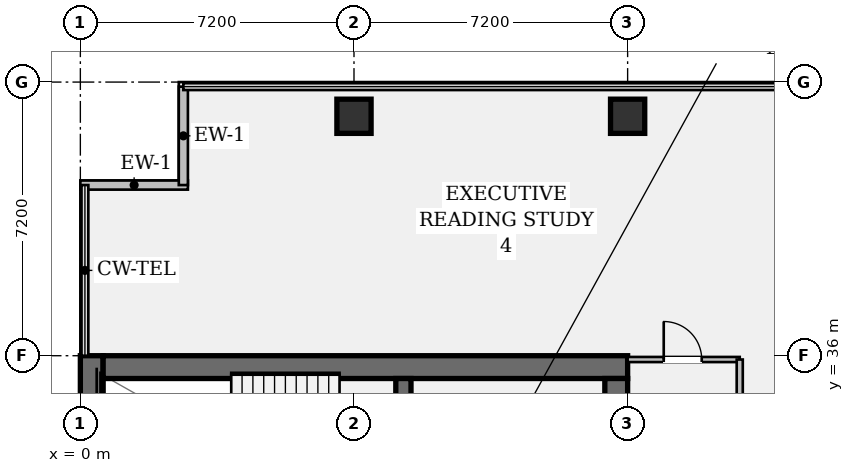
"""IFC4 building model, lengths in metres.
Left out: names, types, materials, properties, quantities, classifications, styles, units other than length and angle.
Written with IfcOpenShell. Run it as: python <this file> out.ifc"""

import sys

from ifc_helpers import new_model, si_unit, direction, frame, frame_2d, origin, origin_2d, place, context, subcontext, project, spatial, rectangle, hollow_rectangle, extrude, element, fill, save


model = new_model("IFC4")
c1 = context("Model", 3, precision=1e-05, world=origin(), true_north=direction((0.0, 1.0)))
c2 = subcontext(c1, "Body", "Model", "MODEL_VIEW")
j1 = project(units=[si_unit("LENGTHUNIT", "METRE"), si_unit("PLANEANGLEUNIT", "RADIAN")], contexts=[c1])
p1 = place(None, origin())
s1 = spatial("IfcSite", under=j1, at=p1, CompositionType="ELEMENT")
p2 = place(p1, origin())
s2 = spatial("IfcBuilding", under=s1, at=p2, CompositionType="ELEMENT")
p3 = place(p2, frame((0.0, 0.0, 140.7)))
s3 = spatial("IfcBuildingStorey", under=s2, at=p3, CompositionType="ELEMENT", Elevation=140.7)
p4 = place(p3, frame((0.3, 7.2, 0.0), z_axis=(0.0, 0.0, 1.0), x_axis=(0.0, 1.0, 0.0)))
e1 = element("IfcWall", 1, at=p4, inside=s3, PredefinedType="SHEAR", context=c2, shape_type="SweptSolid", body=[
    extrude(rectangle(XDim=28.8, YDim=0.6, at=frame_2d((14.4, 0.0))), origin(), (0.0, 0.0, 1.0), 3.58),
])
p5 = place(p3, frame((0.6, 35.7, 0.0), z_axis=(0.0, 0.0, 1.0), x_axis=(1.0, 0.0, 0.0)))
e2 = element("IfcWall", 2, at=p5, inside=s3, PredefinedType="SHEAR", context=c2, shape_type="SweptSolid", body=[
    extrude(rectangle(XDim=13.8, YDim=0.6, at=frame_2d((6.9, 0.0))), origin(), (0.0, 0.0, 1.0), 3.58),
])
p6 = place(p3, frame((14.1, 35.4, 0.0), z_axis=(0.0, 0.0, 1.0), x_axis=(0.0, -1.0, 0.0)))
e3 = element("IfcWall", 3, at=p6, inside=s3, PredefinedType="SHEAR", context=c2, shape_type="SweptSolid", body=[
    extrude(rectangle(XDim=27.6, YDim=0.6, at=frame_2d((13.8, 0.0))), origin(), (0.0, 0.0, 1.0), 3.58),
])
p7 = place(p6, frame((1.3, 0.0, 0.0)))
e4 = element("IfcOpeningElement", 4, at=p7, cuts=e3, PredefinedType="OPENING", context=c2, shape_type="SweptSolid", body=[
    extrude(rectangle(XDim=1.2, YDim=2.15, at=frame_2d((0.6, 1.075))), frame((0.0, 0.312, 0.0), z_axis=(0.0, -1.0, 0.0), x_axis=(1.0, 0.0, 0.0)), (0.0, 0.0, 1.0), 0.624),
])
p8 = place(p6, frame((25.25, 0.0, 0.0)))
e5 = element("IfcOpeningElement", 5, at=p8, cuts=e3, PredefinedType="OPENING", context=c2, shape_type="SweptSolid", body=[
    extrude(rectangle(XDim=1.2, YDim=2.15, at=frame_2d((0.6, 1.075))), frame((0.0, 0.312, 0.0), z_axis=(0.0, -1.0, 0.0), x_axis=(1.0, 0.0, 0.0)), (0.0, 0.0, 1.0), 0.624),
])
p9 = place(p6, frame((14.6, 0.0, 0.0)))
e6 = element("IfcOpeningElement", 6, at=p9, cuts=e3, PredefinedType="OPENING", context=c2, shape_type="SweptSolid", body=[
    extrude(rectangle(XDim=1.6, YDim=2.2, at=frame_2d((0.8, 1.1))), frame((0.0, 0.312, 0.0), z_axis=(0.0, -1.0, 0.0), x_axis=(1.0, 0.0, 0.0)), (0.0, 0.0, 1.0), 0.624),
])
p10 = place(p3, frame((8.5, 31.72, 0.0), z_axis=(0.0, 0.0, 1.0), x_axis=(0.0, 1.0, 0.0)))
e7 = element("IfcWall", 7, at=p10, inside=s3, PredefinedType="SHEAR", context=c2, shape_type="SweptSolid", body=[
    extrude(rectangle(XDim=3.68, YDim=0.4, at=frame_2d((1.84, 0.0))), origin(), (0.0, 0.0, 1.0), 3.58),
])
p11 = place(p10, frame((0.9, 0.0, 0.0)))
e8 = element("IfcOpeningElement", 8, at=p11, cuts=e7, PredefinedType="OPENING", context=c2, shape_type="SweptSolid", body=[
    extrude(rectangle(XDim=1.1, YDim=2.15, at=frame_2d((0.55, 1.075))), frame((0.0, 0.212, 0.0), z_axis=(0.0, -1.0, 0.0), x_axis=(1.0, 0.0, 0.0)), (0.0, 0.0, 1.0), 0.424),
])
for number, where, z_axis, x_axis in (
    (9, (7.2, 42.3, 0.0), (0.0, 0.0, 1.0), (1.0, 0.0, 0.0)),
    (10, (14.4, 42.3, 0.0), (0.0, 0.0, 1.0), (1.0, 0.0, 0.0)),
):
    element("IfcColumn", number, at=place(p3, frame(where, z_axis=z_axis, x_axis=x_axis)), inside=s3, PredefinedType="COLUMN", context=c2, shape_type="SweptSolid", body=[
        extrude(hollow_rectangle(XDim=0.9, YDim=0.9, WallThickness=0.055, at=origin_2d()), origin(), (0.0, 0.0, 1.0), 3.58),
    ])
p12 = place(p3, frame((0.0, 40.49, 0.0), z_axis=(0.0, 0.0, 1.0), x_axis=(1.0, 0.0, 0.0)))
e11 = element("IfcWall", 11, at=p12, inside=s3, PredefinedType="STANDARD", context=c2, shape_type="SweptSolid", body=[
    extrude(rectangle(XDim=2.83, YDim=0.24, at=frame_2d((1.415, 0.0))), origin(), (0.0, 0.0, 1.0), 3.58),
])
p13 = place(p3, frame((2.71, 40.49, 0.0), z_axis=(0.0, 0.0, 1.0), x_axis=(0.0, 1.0, 0.0)))
e12 = element("IfcWall", 12, at=p13, inside=s3, PredefinedType="STANDARD", context=c2, shape_type="SweptSolid", body=[
    extrude(rectangle(XDim=2.59, YDim=0.24, at=frame_2d((1.295, 0.0))), origin(), (0.0, 0.0, 1.0), 3.58),
])
p14 = place(p3, frame((14.4, 35.9, 0.0), z_axis=(0.0, 0.0, 1.0), x_axis=(1.0, 0.0, 0.0)))
e13 = element("IfcWall", 13, at=p14, inside=s3, PredefinedType="PARTITIONING", context=c2, shape_type="SweptSolid", body=[
    extrude(rectangle(XDim=2.95, YDim=0.135, at=frame_2d((1.475, 0.0))), origin(), (0.0, 0.0, 1.0), 2.869),
])
p15 = place(p14, frame((0.95, 0.0, 0.0)))
e14 = element("IfcOpeningElement", 14, at=p15, cuts=e13, PredefinedType="OPENING", context=c2, shape_type="SweptSolid", body=[
    extrude(rectangle(XDim=1.0, YDim=2.15, at=frame_2d((0.5, 1.075))), frame((0.0, 0.08, 0.0), z_axis=(0.0, -1.0, 0.0), x_axis=(1.0, 0.0, 0.0)), (0.0, 0.0, 1.0), 0.159),
])
p16 = place(p3, frame((17.35, 20.7, 0.0), z_axis=(0.0, 0.0, 1.0), x_axis=(0.0, 1.0, 0.0)))
e15 = element("IfcWall", 15, at=p16, inside=s3, PredefinedType="PARTITIONING", context=c2, shape_type="SweptSolid", body=[
    extrude(rectangle(XDim=15.2, YDim=0.16, at=frame_2d((7.6, 0.0))), origin(), (0.0, 0.0, 1.0), 2.869),
])
p17 = place(p16, frame((5.2, 0.0, 0.0)))
e16 = element("IfcOpeningElement", 16, at=p17, cuts=e15, PredefinedType="OPENING", context=c2, shape_type="SweptSolid", body=[
    extrude(rectangle(XDim=0.92, YDim=2.15, at=frame_2d((0.46, 1.075))), frame((0.0, 0.092, 0.0), z_axis=(0.0, -1.0, 0.0), x_axis=(1.0, 0.0, 0.0)), (0.0, 0.0, 1.0), 0.184),
])
p18 = place(p16, frame((10.6, 0.0, 0.0)))
e17 = element("IfcOpeningElement", 17, at=p18, cuts=e15, PredefinedType="OPENING", context=c2, shape_type="SweptSolid", body=[
    extrude(rectangle(XDim=1.0, YDim=2.15, at=frame_2d((0.5, 1.075))), frame((0.0, 0.092, 0.0), z_axis=(0.0, -1.0, 0.0), x_axis=(1.0, 0.0, 0.0)), (0.0, 0.0, 1.0), 0.184),
])
p19 = place(p15, origin())
e18 = element("IfcDoor", 18, at=p19, inside=s3, OperationType="SINGLE_SWING_LEFT", PredefinedType="DOOR", context=c2, shape_type="SweptSolid", body=[
    extrude(rectangle(XDim=1.0, YDim=2.15, at=frame_2d((0.5, 1.075))), frame((0.0, 0.025, 0.0), z_axis=(0.0, -1.0, 0.0), x_axis=(1.0, 0.0, 0.0)), (0.0, 0.0, 1.0), 0.05),
])
fill(e14, e18)
save(model, sys.argv[1])
